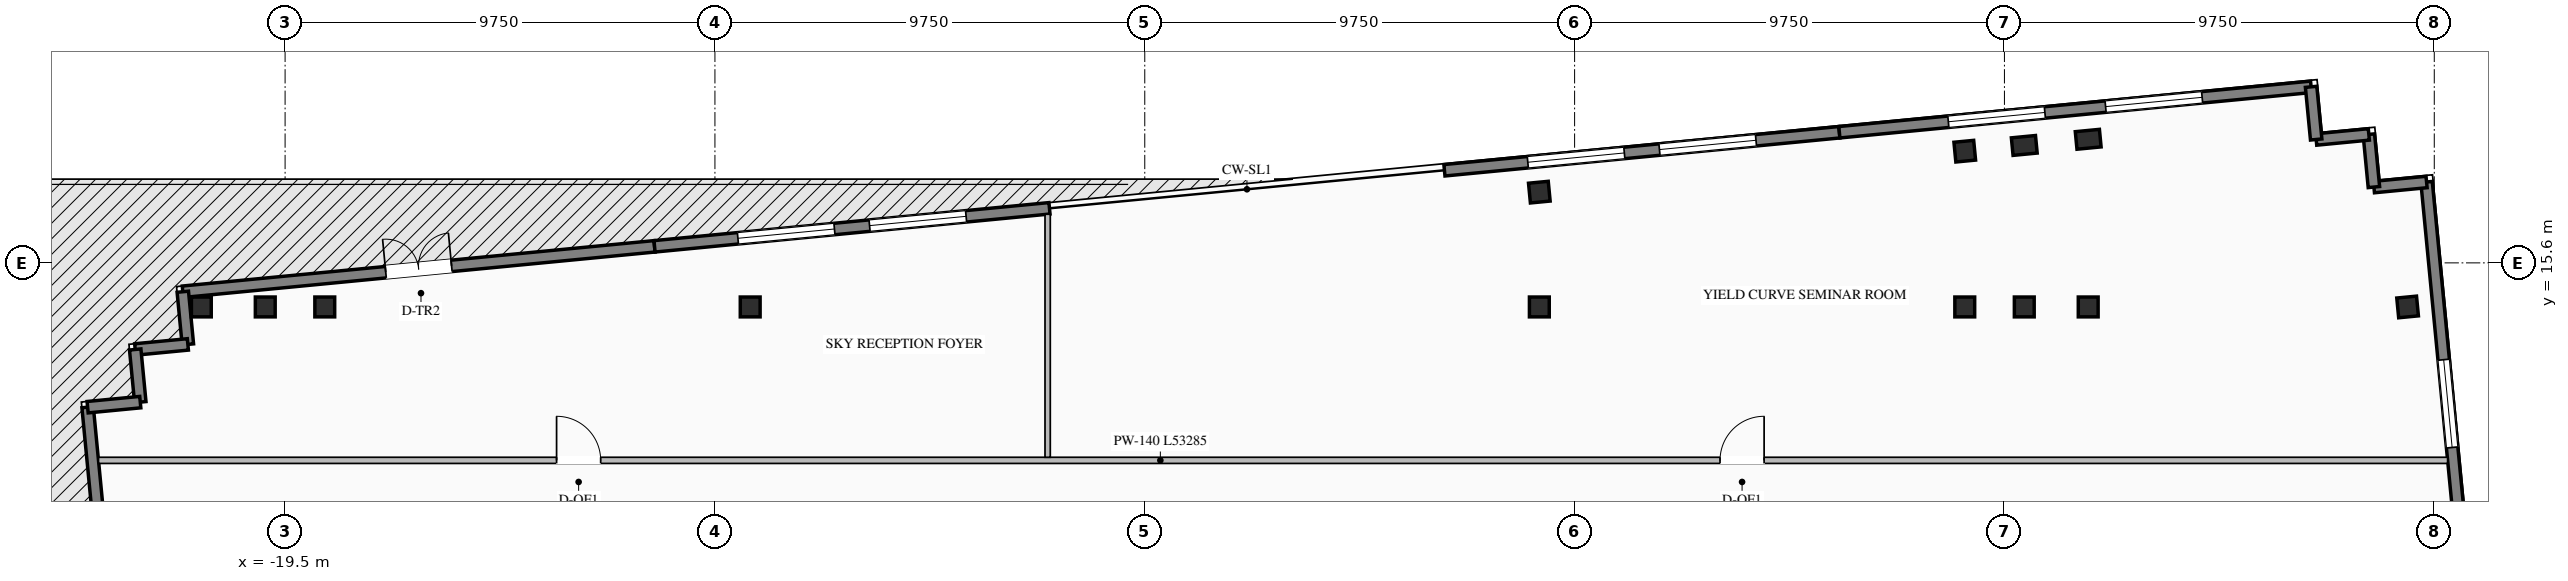
"""IFC4 building model, lengths in metres.
Left out: names, types, materials, properties, quantities, classifications, styles, units other than length and angle.
Written with IfcOpenShell. Run it as: python <this file> out.ifc"""

import sys

from ifc_helpers import new_model, si_unit, direction, frame, frame_2d, origin, origin_2d, place, context, subcontext, project, spatial, rectangle, i_section, extrude, element, fill, save


model = new_model("IFC4")
c1 = context("Model", 3, precision=1e-05, world=origin(), true_north=direction((0.0, 1.0)))
c2 = subcontext(c1, "Body", "Model", "MODEL_VIEW")
j1 = project(units=[si_unit("LENGTHUNIT", "METRE"), si_unit("PLANEANGLEUNIT", "RADIAN")], contexts=[c1])
p1 = place(None, origin())
s1 = spatial("IfcSite", under=j1, at=p1, CompositionType="ELEMENT")
p2 = place(p1, origin())
s2 = spatial("IfcBuilding", under=s1, at=p2, CompositionType="ELEMENT")
p3 = place(p2, frame((0.0, 0.0, 247.5)))
s3 = spatial("IfcBuildingStorey", under=s2, at=p3, CompositionType="ELEMENT", Elevation=247.5)
for number, where, z_axis, x_axis in (
    (1, (-21.4, 14.6, 0.0), (0.0, 0.0, 1.0), (1.0, 0.0, 0.0)),
    (2, (-19.95, 14.6, 0.0), (0.0, 0.0, 1.0), (1.0, 0.0, 0.0)),
    (3, (-18.6, 14.6, 0.0), (0.0, 0.0, 1.0), (1.0, 0.0, 0.0)),
    (4, (-8.95, 14.6, 0.0), (0.0, 0.0, 1.0), (1.0, 0.0, 0.0)),
    (5, (8.95, 14.6, 0.0), (0.0, 0.0, 1.0), (1.0, 0.0, 0.0)),
    (6, (18.6, 14.6, 0.0), (0.0, 0.0, 1.0), (1.0, 0.0, 0.0)),
    (7, (19.95, 14.6, 0.0), (0.0, 0.0, 1.0), (1.0, 0.0, 0.0)),
    (8, (21.4, 14.6, 0.0), (0.0, 0.0, 1.0), (1.0, 0.0, 0.0)),
    (9, (8.95, 17.205, 0.0), (0.0, 0.0, 1.0), (0.995, 0.096, 0.0)),
):
    element("IfcColumn", number, at=place(p3, frame(where, z_axis=z_axis, x_axis=x_axis)), inside=s3, PredefinedType="COLUMN", context=c2, shape_type="SweptSolid", body=[
        extrude(i_section(OverallWidth=0.45, OverallDepth=0.45, WebThickness=0.022, FlangeThickness=0.032, at=origin_2d()), origin(), (0.0, 0.0, 1.0), 4.2),
    ])
for number, where, z_axis, x_axis in (
    (10, (18.6, 18.134, -0.28), (0.0, 0.0, 1.0), (0.995, 0.096, 0.0)),
    (11, (28.645, 14.6, -0.28), (0.0, 0.0, 1.0), (0.995, 0.096, 0.0)),
):
    element("IfcColumn", number, at=place(p3, frame(where, z_axis=z_axis, x_axis=x_axis)), inside=s3, PredefinedType="COLUMN", context=c2, shape_type="SweptSolid", body=[
        extrude(i_section(OverallWidth=0.45, OverallDepth=0.45, WebThickness=0.022, FlangeThickness=0.032, at=origin_2d()), origin(), (0.0, 0.0, 1.0), 4.48),
    ])
for number, where, z_axis, x_axis in (
    (12, (19.95, 18.264, -0.28), (0.0, 0.0, 1.0), (0.995, 0.096, 0.0)),
    (13, (21.4, 18.403, -0.28), (0.0, 0.0, 1.0), (0.995, 0.096, 0.0)),
):
    element("IfcColumn", number, at=place(p3, frame(where, z_axis=z_axis, x_axis=x_axis)), inside=s3, PredefinedType="PILASTER", context=c2, shape_type="SweptSolid", body=[
        extrude(rectangle(XDim=0.55, YDim=0.4, at=origin_2d()), origin(), (0.0, 0.0, 1.0), 4.48),
    ])
p4 = place(p3, frame((-21.821, 14.945, 0.0), z_axis=(0.0, 0.0, 1.0), x_axis=(0.995394787719, 0.095860401528, 0.0)))
e14 = element("IfcWall", 14, at=p4, inside=s3, PredefinedType="STANDARD", context=c2, shape_type="SweptSolid", body=[
    extrude(rectangle(XDim=10.75, YDim=0.26, at=frame_2d((5.375, 0.0))), origin(), (0.0, 0.0, 1.0), 2.195),
])
p5 = place(p4, frame((4.625, 0.0, 0.0)))
e15 = element("IfcOpeningElement", 15, at=p5, cuts=e14, PredefinedType="OPENING", context=c2, shape_type="SweptSolid", body=[
    extrude(rectangle(XDim=1.5, YDim=2.055, at=frame_2d((0.75, 1.027))), frame((0.0, 0.14, 0.0), z_axis=(0.0, -1.0, 0.0), x_axis=(1.0, 0.0, 0.0)), (0.0, 0.0, 1.0), 0.28),
])
p6 = place(p3, frame((-11.12, 15.975, 0.0), z_axis=(0.0, 0.0, 1.0), x_axis=(0.995396794462, 0.09583956164, 0.0)))
e16 = element("IfcWall", 16, at=p6, inside=s3, PredefinedType="STANDARD", context=c2, shape_type="SweptSolid", body=[
    extrude(rectangle(XDim=9.0, YDim=0.26, at=frame_2d((4.5, 0.0))), origin(), (0.0, 0.0, 1.0), 4.0),
])
p7 = place(p6, frame((1.9, 0.0, 0.76)))
e17 = element("IfcOpeningElement", 17, at=p7, cuts=e16, PredefinedType="OPENING", context=c2, shape_type="SweptSolid", body=[
    extrude(rectangle(XDim=2.2, YDim=2.25, at=frame_2d((1.1, 1.125))), frame((0.0, 0.14, 0.0), z_axis=(0.0, -1.0, 0.0), x_axis=(1.0, 0.0, 0.0)), (0.0, 0.0, 1.0), 0.28),
])
p8 = place(p6, frame((4.9, 0.0, 0.76)))
e18 = element("IfcOpeningElement", 18, at=p8, cuts=e16, PredefinedType="OPENING", context=c2, shape_type="SweptSolid", body=[
    extrude(rectangle(XDim=2.2, YDim=2.25, at=frame_2d((1.1, 1.125))), frame((0.0, 0.14, 0.0), z_axis=(0.0, -1.0, 0.0), x_axis=(1.0, 0.0, 0.0)), (0.0, 0.0, 1.0), 0.28),
])
p9 = place(p3, frame((6.797, 17.7, 0.0), z_axis=(0.0, 0.0, 1.0), x_axis=(0.995394455533, 0.09586385082, 0.0)))
e19 = element("IfcWall", 19, at=p9, inside=s3, PredefinedType="STANDARD", context=c2, shape_type="SweptSolid", body=[
    extrude(rectangle(XDim=9.0, YDim=0.26, at=frame_2d((4.5, 0.0))), origin(), (0.0, 0.0, 1.0), 4.0),
])
p10 = place(p9, frame((1.9, 0.0, 0.76)))
e20 = element("IfcOpeningElement", 20, at=p10, cuts=e19, PredefinedType="OPENING", context=c2, shape_type="SweptSolid", body=[
    extrude(rectangle(XDim=2.2, YDim=2.25, at=frame_2d((1.1, 1.125))), frame((0.0, 0.14, 0.0), z_axis=(0.0, -1.0, 0.0), x_axis=(1.0, 0.0, 0.0)), (0.0, 0.0, 1.0), 0.28),
])
p11 = place(p9, frame((4.9, 0.0, 0.76)))
e21 = element("IfcOpeningElement", 21, at=p11, cuts=e19, PredefinedType="OPENING", context=c2, shape_type="SweptSolid", body=[
    extrude(rectangle(XDim=2.2, YDim=2.25, at=frame_2d((1.1, 1.125))), frame((0.0, 0.14, 0.0), z_axis=(0.0, -1.0, 0.0), x_axis=(1.0, 0.0, 0.0)), (0.0, 0.0, 1.0), 0.28),
])
p12 = place(p3, frame((15.756, 18.563, 0.0), z_axis=(0.0, 0.0, 1.0), x_axis=(0.995396745868, 0.095840066339, 0.0)))
e22 = element("IfcWall", 22, at=p12, inside=s3, PredefinedType="STANDARD", context=c2, shape_type="SweptSolid", body=[
    extrude(rectangle(XDim=10.75, YDim=0.26, at=frame_2d((5.375, 0.0))), origin(), (0.0, 0.0, 1.0), 4.0),
])
p13 = place(p12, frame((2.483, 0.0, 0.76)))
e23 = element("IfcOpeningElement", 23, at=p13, cuts=e22, PredefinedType="OPENING", context=c2, shape_type="SweptSolid", body=[
    extrude(rectangle(XDim=2.2, YDim=2.25, at=frame_2d((1.1, 1.125))), frame((0.0, 0.14, 0.0), z_axis=(0.0, -1.0, 0.0), x_axis=(1.0, 0.0, 0.0)), (0.0, 0.0, 1.0), 0.28),
])
p14 = place(p12, frame((6.067, 0.0, 0.76)))
e24 = element("IfcOpeningElement", 24, at=p14, cuts=e22, PredefinedType="OPENING", context=c2, shape_type="SweptSolid", body=[
    extrude(rectangle(XDim=2.2, YDim=2.25, at=frame_2d((1.1, 1.125))), frame((0.0, 0.14, 0.0), z_axis=(0.0, -1.0, 0.0), x_axis=(1.0, 0.0, 0.0)), (0.0, 0.0, 1.0), 0.28),
])
p15 = place(p3, frame((-22.527, -2.754, 0.0), z_axis=(0.0, 0.0, 1.0), x_axis=(-0.095850890337, 0.995395703638, 0.0)))
e25 = element("IfcWall", 25, at=p15, inside=s3, PredefinedType="STANDARD", context=c2, shape_type="SweptSolid", body=[
    extrude(rectangle(XDim=15.15, YDim=0.26, at=frame_2d((7.575, 0.0))), origin(), (0.0, 0.0, 1.0), 4.0),
])
p16 = place(p15, frame((6.825, 0.0, 0.0)))
e26 = element("IfcOpeningElement", 26, at=p16, cuts=e25, PredefinedType="OPENING", context=c2, shape_type="SweptSolid", body=[
    extrude(rectangle(XDim=1.5, YDim=2.15, at=frame_2d((0.75, 1.075))), frame((0.0, 0.14, 0.0), z_axis=(0.0, -1.0, 0.0), x_axis=(1.0, 0.0, 0.0)), (0.0, 0.0, 1.0), 0.28),
])
p17 = place(p3, frame((29.075, 17.435, 0.0), z_axis=(0.0, 0.0, 1.0), x_axis=(0.095850890337, -0.995395703638, 0.0)))
e27 = element("IfcWall", 27, at=p17, inside=s3, PredefinedType="STANDARD", context=c2, shape_type="SweptSolid", body=[
    extrude(rectangle(XDim=15.15, YDim=0.26, at=frame_2d((7.575, 0.0))), origin(), (0.0, 0.0, 1.0), 4.0),
])
p18 = place(p17, frame((4.05, 0.0, 0.76)))
e28 = element("IfcOpeningElement", 28, at=p18, cuts=e27, PredefinedType="OPENING", context=c2, shape_type="SweptSolid", body=[
    extrude(rectangle(XDim=2.0, YDim=2.05, at=frame_2d((1.0, 1.025))), frame((0.0, 0.14, 0.0), z_axis=(0.0, -1.0, 0.0), x_axis=(1.0, 0.0, 0.0)), (0.0, 0.0, 1.0), 0.28),
])
p19 = place(p17, frame((9.1, 0.0, 0.76)))
e29 = element("IfcOpeningElement", 29, at=p19, cuts=e27, PredefinedType="OPENING", context=c2, shape_type="SweptSolid", body=[
    extrude(rectangle(XDim=2.0, YDim=2.05, at=frame_2d((1.0, 1.025))), frame((0.0, 0.14, 0.0), z_axis=(0.0, -1.0, 0.0), x_axis=(1.0, 0.0, 0.0)), (0.0, 0.0, 1.0), 0.28),
])
for number, where, z_axis, x_axis in (
    (30, (29.075, 17.435, 0.0), (0.0, 0.0, 1.0), (-0.995, -0.096, 0.0)),
    (31, (27.881, 17.32, 0.0), (0.0, 0.0, 1.0), (-0.096, 0.995, 0.0)),
):
    element("IfcWall", number, at=place(p3, frame(where, z_axis=z_axis, x_axis=x_axis)), inside=s3, PredefinedType="STANDARD", context=c2, shape_type="SweptSolid", body=[
        extrude(rectangle(XDim=1.2, YDim=0.26, at=frame_2d((0.6, 0.0))), origin(), (0.0, 0.0, 1.0), 4.0),
    ])
for number, where, z_axis, x_axis in (
    (32, (27.766, 18.514, 0.0), (0.0, 0.0, 1.0), (-0.995, -0.096, 0.0)),
    (33, (26.571, 18.399, 0.0), (0.0, 0.0, 1.0), (-0.096, 0.995, 0.0)),
):
    element("IfcWall", number, at=place(p3, frame(where, z_axis=z_axis, x_axis=x_axis)), inside=s3, PredefinedType="STANDARD", context=c2, shape_type="SweptSolid", body=[
        extrude(rectangle(XDim=1.2, YDim=0.26, at=frame_2d((0.6, 0.0))), origin(), (0.0, 0.0, 1.0), 4.0),
    ])
p20 = place(p3, frame((-21.821, 14.945, 0.0), z_axis=(0.0, 0.0, 1.0), x_axis=(0.096038073607, -0.995377661201, 0.0)))
e34 = element("IfcWall", 34, at=p20, inside=s3, PredefinedType="STANDARD", context=c2, shape_type="SweptSolid", body=[
    extrude(rectangle(XDim=1.2, YDim=0.26, at=frame_2d((0.6, 0.0))), origin(), (0.0, 0.0, 1.0), 2.195),
])
for number, where, z_axis, x_axis in (
    (35, (-21.705, 13.75, 0.0), (0.0, 0.0, 1.0), (-0.995, -0.096, 0.0)),
    (36, (-22.9, 13.635, 0.0), (0.0, 0.0, 1.0), (0.096, -0.995, 0.0)),
    (37, (-22.785, 12.441, 0.0), (0.0, 0.0, 1.0), (-0.995, -0.096, 0.0)),
):
    element("IfcWall", number, at=place(p3, frame(where, z_axis=z_axis, x_axis=x_axis)), inside=s3, PredefinedType="STANDARD", context=c2, shape_type="SweptSolid", body=[
        extrude(rectangle(XDim=1.2, YDim=0.26, at=frame_2d((0.6, 0.0))), origin(), (0.0, 0.0, 1.0), 2.195),
    ])
p21 = place(p3, frame((-23.733, 11.12, 0.0), z_axis=(0.0, 0.0, 1.0), x_axis=(1.0, 0.0, 0.0)))
e38 = element("IfcWall", 38, at=p21, inside=s3, PredefinedType="STANDARD", context=c2, shape_type="SweptSolid", body=[
    extrude(rectangle(XDim=53.285, YDim=0.14, at=frame_2d((26.643, 0.0))), origin(), (0.0, 0.0, 1.0), 4.0),
])
p22 = place(p21, frame((10.391, 0.0, 0.0)))
e39 = element("IfcOpeningElement", 39, at=p22, cuts=e38, PredefinedType="OPENING", context=c2, shape_type="SweptSolid", body=[
    extrude(rectangle(XDim=1.0, YDim=2.08, at=frame_2d((0.5, 1.04))), frame((0.0, 0.08, 0.0), z_axis=(0.0, -1.0, 0.0), x_axis=(1.0, 0.0, 0.0)), (0.0, 0.0, 1.0), 0.16),
])
p23 = place(p21, frame((36.781, 0.0, 0.0)))
e40 = element("IfcOpeningElement", 40, at=p23, cuts=e38, PredefinedType="OPENING", context=c2, shape_type="SweptSolid", body=[
    extrude(rectangle(XDim=1.0, YDim=2.08, at=frame_2d((0.5, 1.04))), frame((0.0, 0.08, 0.0), z_axis=(0.0, -1.0, 0.0), x_axis=(1.0, 0.0, 0.0)), (0.0, 0.0, 1.0), 0.16),
])
p24 = place(p3, frame((-2.203, 11.19, 0.0), z_axis=(0.0, 0.0, 1.0), x_axis=(0.0, 1.0, 0.0)))
e41 = element("IfcWall", 41, at=p24, inside=s3, PredefinedType="STANDARD", context=c2, shape_type="SweptSolid", body=[
    extrude(rectangle(XDim=5.513, YDim=0.12, at=frame_2d((2.757, 0.0))), origin(), (0.0, 0.0, 1.0), 4.0),
])
p25 = place(p5, origin())
e42 = element("IfcDoor", 42, at=p25, inside=s3, OperationType="DOUBLE_DOOR_SINGLE_SWING", PredefinedType="DOOR", context=c2, shape_type="SweptSolid", body=[
    extrude(rectangle(XDim=1.5, YDim=2.055, at=frame_2d((0.75, 1.027))), frame((0.0, 0.025, 0.0), z_axis=(0.0, -1.0, 0.0), x_axis=(1.0, 0.0, 0.0)), (0.0, 0.0, 1.0), 0.05),
])
fill(e15, e42)
p26 = place(p7, origin())
e43 = element("IfcWindow", 43, at=p26, inside=s3, PartitioningType="DOUBLE_PANEL_VERTICAL", PredefinedType="WINDOW", context=c2, shape_type="SweptSolid", body=[
    extrude(rectangle(XDim=2.2, YDim=2.25, at=frame_2d((1.1, 1.125))), frame((0.0, 0.03, 0.0), z_axis=(0.0, -1.0, 0.0), x_axis=(1.0, 0.0, 0.0)), (0.0, 0.0, 1.0), 0.06),
])
fill(e17, e43)
p27 = place(p8, origin())
e44 = element("IfcWindow", 44, at=p27, inside=s3, PartitioningType="DOUBLE_PANEL_VERTICAL", PredefinedType="WINDOW", context=c2, shape_type="SweptSolid", body=[
    extrude(rectangle(XDim=2.2, YDim=2.25, at=frame_2d((1.1, 1.125))), frame((0.0, 0.03, 0.0), z_axis=(0.0, -1.0, 0.0), x_axis=(1.0, 0.0, 0.0)), (0.0, 0.0, 1.0), 0.06),
])
fill(e18, e44)
p28 = place(p10, origin())
e45 = element("IfcWindow", 45, at=p28, inside=s3, PartitioningType="DOUBLE_PANEL_VERTICAL", PredefinedType="WINDOW", context=c2, shape_type="SweptSolid", body=[
    extrude(rectangle(XDim=2.2, YDim=2.25, at=frame_2d((1.1, 1.125))), frame((0.0, 0.03, 0.0), z_axis=(0.0, -1.0, 0.0), x_axis=(1.0, 0.0, 0.0)), (0.0, 0.0, 1.0), 0.06),
])
fill(e20, e45)
p29 = place(p11, origin())
e46 = element("IfcWindow", 46, at=p29, inside=s3, PartitioningType="DOUBLE_PANEL_VERTICAL", PredefinedType="WINDOW", context=c2, shape_type="SweptSolid", body=[
    extrude(rectangle(XDim=2.2, YDim=2.25, at=frame_2d((1.1, 1.125))), frame((0.0, 0.03, 0.0), z_axis=(0.0, -1.0, 0.0), x_axis=(1.0, 0.0, 0.0)), (0.0, 0.0, 1.0), 0.06),
])
fill(e21, e46)
p30 = place(p13, origin())
e47 = element("IfcWindow", 47, at=p30, inside=s3, PartitioningType="DOUBLE_PANEL_VERTICAL", PredefinedType="WINDOW", context=c2, shape_type="SweptSolid", body=[
    extrude(rectangle(XDim=2.2, YDim=2.25, at=frame_2d((1.1, 1.125))), frame((0.0, 0.03, 0.0), z_axis=(0.0, -1.0, 0.0), x_axis=(1.0, 0.0, 0.0)), (0.0, 0.0, 1.0), 0.06),
])
fill(e23, e47)
p31 = place(p14, origin())
e48 = element("IfcWindow", 48, at=p31, inside=s3, PartitioningType="DOUBLE_PANEL_VERTICAL", PredefinedType="WINDOW", context=c2, shape_type="SweptSolid", body=[
    extrude(rectangle(XDim=2.2, YDim=2.25, at=frame_2d((1.1, 1.125))), frame((0.0, 0.03, 0.0), z_axis=(0.0, -1.0, 0.0), x_axis=(1.0, 0.0, 0.0)), (0.0, 0.0, 1.0), 0.06),
])
fill(e24, e48)
p32 = place(p18, origin())
e49 = element("IfcWindow", 49, at=p32, inside=s3, PartitioningType="DOUBLE_PANEL_VERTICAL", PredefinedType="WINDOW", context=c2, shape_type="SweptSolid", body=[
    extrude(rectangle(XDim=2.0, YDim=2.05, at=frame_2d((1.0, 1.025))), frame((0.0, 0.03, 0.0), z_axis=(0.0, -1.0, 0.0), x_axis=(1.0, 0.0, 0.0)), (0.0, 0.0, 1.0), 0.06),
])
fill(e28, e49)
p33 = place(p22, origin())
e50 = element("IfcDoor", 50, at=p33, inside=s3, OperationType="SINGLE_SWING_LEFT", PredefinedType="DOOR", context=c2, shape_type="SweptSolid", body=[
    extrude(rectangle(XDim=1.0, YDim=2.08, at=frame_2d((0.5, 1.04))), frame((0.0, 0.025, 0.0), z_axis=(0.0, -1.0, 0.0), x_axis=(1.0, 0.0, 0.0)), (0.0, 0.0, 1.0), 0.05),
])
fill(e39, e50)
p34 = place(p23, origin())
e51 = element("IfcDoor", 51, at=p34, inside=s3, OperationType="SINGLE_SWING_RIGHT", PredefinedType="DOOR", context=c2, shape_type="SweptSolid", body=[
    extrude(rectangle(XDim=1.0, YDim=2.08, at=frame_2d((0.5, 1.04))), frame((0.0, 0.025, 0.0), z_axis=(0.0, -1.0, 0.0), x_axis=(1.0, 0.0, 0.0)), (0.0, 0.0, 1.0), 0.05),
])
fill(e40, e51)
save(model, sys.argv[1])
